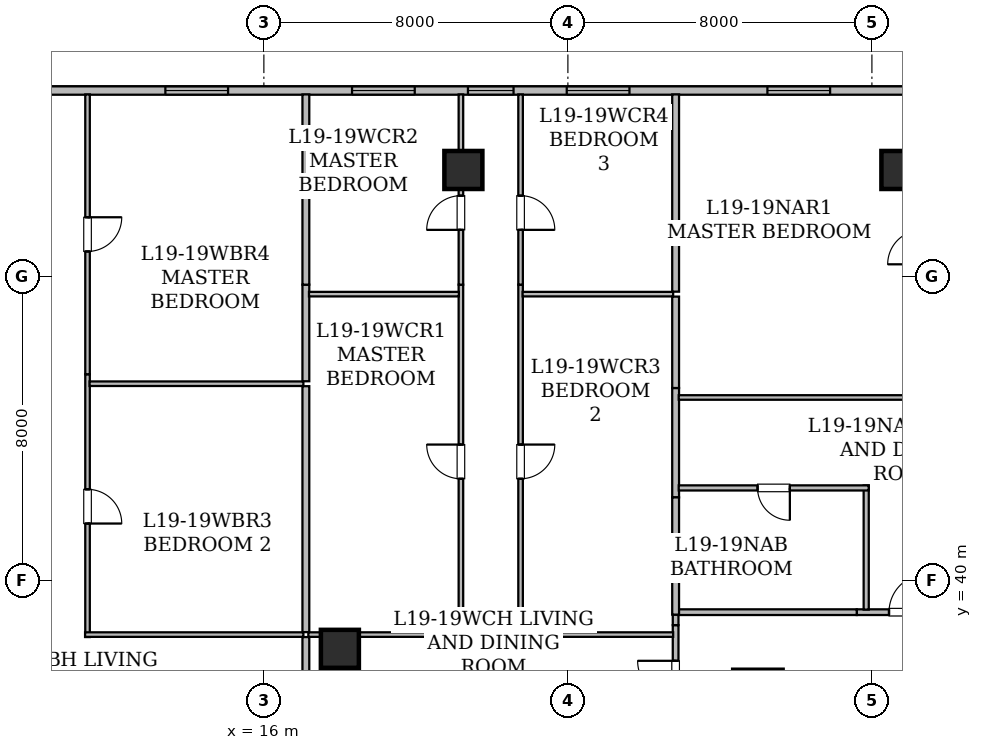
"""IFC4 building model, lengths in metres.
Left out: names, types, materials, properties, quantities, classifications, styles, units other than length and angle.
Written with IfcOpenShell. Run it as: python <this file> out.ifc"""

import sys

from ifc_helpers import new_model, si_unit, direction, frame, frame_2d, origin, origin_2d, place, context, subcontext, project, spatial, rectangle, hollow_rectangle, extrude, element, fill, save


model = new_model("IFC4")
c1 = context("Model", 3, precision=1e-05, world=origin(), true_north=direction((0.0, 1.0)))
c2 = subcontext(c1, "Body", "Model", "MODEL_VIEW")
j1 = project(units=[si_unit("LENGTHUNIT", "METRE"), si_unit("PLANEANGLEUNIT", "RADIAN")], contexts=[c1])
p1 = place(None, origin())
s1 = spatial("IfcSite", under=j1, at=p1, CompositionType="ELEMENT")
p2 = place(p1, origin())
s2 = spatial("IfcBuilding", under=s1, at=p2, CompositionType="ELEMENT")
p3 = place(p2, frame((0.0, 0.0, 77.1)))
s3 = spatial("IfcBuildingStorey", under=s2, at=p3, CompositionType="ELEMENT", Elevation=77.1)
p4 = place(p3, frame((29.0, 37.0, 0.0), z_axis=(0.0, 0.0, 1.0), x_axis=(1.0, 0.0, 0.0)))
e1 = element("IfcColumn", 1, at=p4, inside=s3, PredefinedType="COLUMN", context=c2, shape_type="SweptSolid", body=[
    extrude(hollow_rectangle(XDim=1.3, YDim=1.3, WallThickness=0.065, at=origin_2d()), origin(), (0.0, 0.0, 1.0), 3.65),
])
for number, where, z_axis, x_axis in (
    (2, (21.25, 50.8, 0.0), (0.0, 0.0, 1.0), (1.0, 0.0, 0.0)),
    (3, (32.75, 50.8, 0.0), (0.0, 0.0, 1.0), (1.0, 0.0, 0.0)),
    (4, (18.0, 38.2, 0.0), (0.0, 0.0, 1.0), (1.0, 0.0, 0.0)),
):
    element("IfcColumn", number, at=place(p3, frame(where, z_axis=z_axis, x_axis=x_axis)), inside=s3, PredefinedType="COLUMN", context=c2, shape_type="SweptSolid", body=[
        extrude(hollow_rectangle(XDim=1.0, YDim=1.0, WallThickness=0.05, at=origin_2d()), origin(), (0.0, 0.0, 1.0), 3.65),
    ])
p5 = place(p3, frame((8.315, 52.89, 0.0), z_axis=(0.0, 0.0, 1.0), x_axis=(1.0, 0.0, 0.0)))
e5 = element("IfcWall", 5, at=p5, inside=s3, PredefinedType="STANDARD", context=c2, shape_type="SweptSolid", body=[
    extrude(rectangle(XDim=37.439, YDim=0.22, at=frame_2d((18.719, 0.0))), origin(), (0.0, 0.0, 1.0), 3.43),
])
p6 = place(p5, frame((5.093, 0.0, 0.85)))
e6 = element("IfcOpeningElement", 6, at=p6, cuts=e5, PredefinedType="OPENING", context=c2, shape_type="SweptSolid", body=[
    extrude(rectangle(XDim=1.65, YDim=1.55, at=frame_2d((0.825, 0.775))), frame((0.0, 0.12, 0.0), z_axis=(0.0, -1.0, 0.0), x_axis=(1.0, 0.0, 0.0)), (0.0, 0.0, 1.0), 0.24),
])
p7 = place(p5, frame((13.055, 0.0, 0.8)))
e7 = element("IfcOpeningElement", 7, at=p7, cuts=e5, PredefinedType="OPENING", context=c2, shape_type="SweptSolid", body=[
    extrude(rectangle(XDim=1.2, YDim=1.5, at=frame_2d((0.6, 0.75))), frame((0.0, 0.12, 0.0), z_axis=(0.0, -1.0, 0.0), x_axis=(1.0, 0.0, 0.0)), (0.0, 0.0, 1.0), 0.24),
])
p8 = place(p5, frame((10.005, 0.0, 0.85)))
e8 = element("IfcOpeningElement", 8, at=p8, cuts=e5, PredefinedType="OPENING", context=c2, shape_type="SweptSolid", body=[
    extrude(rectangle(XDim=1.65, YDim=1.55, at=frame_2d((0.825, 0.775))), frame((0.0, 0.12, 0.0), z_axis=(0.0, -1.0, 0.0), x_axis=(1.0, 0.0, 0.0)), (0.0, 0.0, 1.0), 0.24),
])
p9 = place(p5, frame((15.655, 0.0, 0.85)))
e9 = element("IfcOpeningElement", 9, at=p9, cuts=e5, PredefinedType="OPENING", context=c2, shape_type="SweptSolid", body=[
    extrude(rectangle(XDim=1.65, YDim=1.55, at=frame_2d((0.825, 0.775))), frame((0.0, 0.12, 0.0), z_axis=(0.0, -1.0, 0.0), x_axis=(1.0, 0.0, 0.0)), (0.0, 0.0, 1.0), 0.24),
])
p10 = place(p5, frame((25.185, 0.0, 0.8)))
e10 = element("IfcOpeningElement", 10, at=p10, cuts=e5, PredefinedType="OPENING", context=c2, shape_type="SweptSolid", body=[
    extrude(rectangle(XDim=1.2, YDim=1.5, at=frame_2d((0.6, 0.75))), frame((0.0, 0.12, 0.0), z_axis=(0.0, -1.0, 0.0), x_axis=(1.0, 0.0, 0.0)), (0.0, 0.0, 1.0), 0.24),
])
p11 = place(p5, frame((20.935, 0.0, 0.85)))
e11 = element("IfcOpeningElement", 11, at=p11, cuts=e5, PredefinedType="OPENING", context=c2, shape_type="SweptSolid", body=[
    extrude(rectangle(XDim=1.65, YDim=1.55, at=frame_2d((0.825, 0.775))), frame((0.0, 0.12, 0.0), z_axis=(0.0, -1.0, 0.0), x_axis=(1.0, 0.0, 0.0)), (0.0, 0.0, 1.0), 0.24),
])
p12 = place(p5, frame((28.985, 0.0, 0.85)))
e12 = element("IfcOpeningElement", 12, at=p12, cuts=e5, PredefinedType="OPENING", context=c2, shape_type="SweptSolid", body=[
    extrude(rectangle(XDim=1.65, YDim=1.55, at=frame_2d((0.825, 0.775))), frame((0.0, 0.12, 0.0), z_axis=(0.0, -1.0, 0.0), x_axis=(1.0, 0.0, 0.0)), (0.0, 0.0, 1.0), 0.24),
])
p13 = place(p5, frame((33.98, 0.0, 0.85)))
e13 = element("IfcOpeningElement", 13, at=p13, cuts=e5, PredefinedType="OPENING", context=c2, shape_type="SweptSolid", body=[
    extrude(rectangle(XDim=1.65, YDim=1.55, at=frame_2d((0.825, 0.775))), frame((0.0, 0.12, 0.0), z_axis=(0.0, -1.0, 0.0), x_axis=(1.0, 0.0, 0.0)), (0.0, 0.0, 1.0), 0.24),
])
p14 = place(p3, frame((26.835, 35.946, 0.0), z_axis=(0.0, 0.0, 1.0), x_axis=(0.0, 1.0, 0.0)))
e14 = element("IfcWall", 14, at=p14, inside=s3, PredefinedType="STANDARD", context=c2, shape_type="SweptSolid", body=[
    extrude(rectangle(XDim=2.878, YDim=0.15, at=frame_2d((1.439, 0.0))), origin(), (0.0, 0.0, 1.0), 2.647),
])
p15 = place(p14, frame((0.939, 0.0, 0.0)))
e15 = element("IfcOpeningElement", 15, at=p15, cuts=e14, PredefinedType="OPENING", context=c2, shape_type="SweptSolid", body=[
    extrude(rectangle(XDim=1.0, YDim=2.15, at=frame_2d((0.5, 1.075))), frame((0.0, 0.085, 0.0), z_axis=(0.0, -1.0, 0.0), x_axis=(1.0, 0.0, 0.0)), (0.0, 0.0, 1.0), 0.17),
])
p16 = place(p3, frame((26.835, 38.824, 0.0), z_axis=(0.0, 0.0, 1.0), x_axis=(0.0, 1.0, 0.0)))
e16 = element("IfcWall", 16, at=p16, inside=s3, PredefinedType="STANDARD", context=c2, shape_type="SweptSolid", body=[
    extrude(rectangle(XDim=0.276, YDim=0.15, at=frame_2d((0.138, 0.0))), origin(), (0.0, 0.0, 1.0), 3.43),
])
p17 = place(p3, frame((31.601, 39.165, 0.0), z_axis=(0.0, 0.0, 1.0), x_axis=(1.0, 0.0, 0.0)))
e17 = element("IfcWall", 17, at=p17, inside=s3, PredefinedType="STANDARD", context=c2, shape_type="SweptSolid", body=[
    extrude(rectangle(XDim=2.698, YDim=0.15, at=frame_2d((1.349, 0.0))), origin(), (0.0, 0.0, 1.0), 3.43),
])
p18 = place(p17, frame((0.849, 0.0, 0.0)))
e18 = element("IfcOpeningElement", 18, at=p18, cuts=e17, PredefinedType="OPENING", context=c2, shape_type="SweptSolid", body=[
    extrude(rectangle(XDim=1.0, YDim=2.15, at=frame_2d((0.5, 1.075))), frame((0.0, 0.085, 0.0), z_axis=(0.0, -1.0, 0.0), x_axis=(1.0, 0.0, 0.0)), (0.0, 0.0, 1.0), 0.17),
])
p19 = place(p3, frame((26.9, 39.165, 0.0), z_axis=(0.0, 0.0, 1.0), x_axis=(1.0, 0.0, 0.0)))
e19 = element("IfcWall", 19, at=p19, inside=s3, PredefinedType="STANDARD", context=c2, shape_type="SweptSolid", body=[
    extrude(rectangle(XDim=4.701, YDim=0.15, at=frame_2d((2.351, 0.0))), origin(), (0.0, 0.0, 1.0), 2.647),
])
p20 = place(p3, frame((11.36, 45.425, 0.0), z_axis=(0.0, 0.0, 1.0), x_axis=(0.0, -1.0, 0.0)))
e20 = element("IfcWall", 20, at=p20, inside=s3, PredefinedType="PARTITIONING", context=c2, shape_type="SweptSolid", body=[
    extrude(rectangle(XDim=6.915, YDim=0.12, at=frame_2d((3.458, 0.0))), origin(), (0.0, 0.0, 1.0), 2.647),
])
p21 = place(p20, frame((3.028, 0.0, 0.0)))
e21 = element("IfcOpeningElement", 21, at=p21, cuts=e20, PredefinedType="OPENING", context=c2, shape_type="SweptSolid", body=[
    extrude(rectangle(XDim=0.9, YDim=2.1, at=frame_2d((0.45, 1.05))), frame((0.0, 0.07, 0.0), z_axis=(0.0, -1.0, 0.0), x_axis=(1.0, 0.0, 0.0)), (0.0, 0.0, 1.0), 0.14),
])
p22 = place(p3, frame((11.295, 38.575, 0.0), z_axis=(0.0, 0.0, 1.0), x_axis=(1.0, 0.0, 0.0)))
e22 = element("IfcWall", 22, at=p22, inside=s3, PredefinedType="PARTITIONING", context=c2, shape_type="SweptSolid", body=[
    extrude(rectangle(XDim=5.745, YDim=0.12, at=frame_2d((2.873, 0.0))), origin(), (0.0, 0.0, 1.0), 2.647),
])
p23 = place(p3, frame((11.36, 52.788, 0.0), z_axis=(0.0, 0.0, 1.0), x_axis=(0.0, -1.0, 0.0)))
e23 = element("IfcWall", 23, at=p23, inside=s3, PredefinedType="PARTITIONING", context=c2, shape_type="SweptSolid", body=[
    extrude(rectangle(XDim=7.363, YDim=0.12, at=frame_2d((3.682, 0.0))), origin(), (0.0, 0.0, 1.0), 2.647),
])
p24 = place(p23, frame((3.232, 0.0, 0.0)))
e24 = element("IfcOpeningElement", 24, at=p24, cuts=e23, PredefinedType="OPENING", context=c2, shape_type="SweptSolid", body=[
    extrude(rectangle(XDim=0.9, YDim=2.1, at=frame_2d((0.45, 1.05))), frame((0.0, 0.07, 0.0), z_axis=(0.0, -1.0, 0.0), x_axis=(1.0, 0.0, 0.0)), (0.0, 0.0, 1.0), 0.14),
])
p25 = place(p3, frame((17.105, 38.51, 0.0), z_axis=(0.0, 0.0, 1.0), x_axis=(0.0, -1.0, 0.0)))
e25 = element("IfcWall", 25, at=p25, inside=s3, PredefinedType="STANDARD", context=c2, shape_type="SweptSolid", body=[
    extrude(rectangle(XDim=2.25, YDim=0.18, at=frame_2d((1.125, 0.0))), origin(), (0.0, 0.0, 1.0), 2.647),
])
p26 = place(p3, frame((11.414, 45.176, 0.0), z_axis=(0.0, 0.0, 1.0), x_axis=(1.0, 0.0, 0.0)))
e26 = element("IfcWall", 26, at=p26, inside=s3, PredefinedType="PARTITIONING", context=c2, shape_type="SweptSolid", body=[
    extrude(rectangle(XDim=5.626, YDim=0.12, at=frame_2d((2.813, 0.0))), origin(), (0.0, 0.0, 1.0), 2.647),
])
p27 = place(p3, frame((17.105, 45.111, 0.0), z_axis=(0.0, 0.0, 1.0), x_axis=(0.0, -1.0, 0.0)))
e27 = element("IfcWall", 27, at=p27, inside=s3, PredefinedType="STANDARD", context=c2, shape_type="SweptSolid", body=[
    extrude(rectangle(XDim=6.471, YDim=0.18, at=frame_2d((3.236, 0.0))), origin(), (0.0, 0.0, 1.0), 2.647),
])
p28 = place(p3, frame((17.105, 47.782, 0.0), z_axis=(0.0, 0.0, 1.0), x_axis=(0.0, -1.0, 0.0)))
e28 = element("IfcWall", 28, at=p28, inside=s3, PredefinedType="STANDARD", context=c2, shape_type="SweptSolid", body=[
    extrude(rectangle(XDim=2.541, YDim=0.18, at=frame_2d((1.271, 0.0))), origin(), (0.0, 0.0, 1.0), 3.43),
])
p29 = place(p3, frame((17.105, 52.788, 0.0), z_axis=(0.0, 0.0, 1.0), x_axis=(0.0, -1.0, 0.0)))
e29 = element("IfcWall", 29, at=p29, inside=s3, PredefinedType="STANDARD", context=c2, shape_type="SweptSolid", body=[
    extrude(rectangle(XDim=5.006, YDim=0.18, at=frame_2d((2.503, 0.0))), origin(), (0.0, 0.0, 1.0), 2.803),
])
p30 = place(p3, frame((17.17, 38.575, 0.0), z_axis=(0.0, 0.0, 1.0), x_axis=(1.0, 0.0, 0.0)))
e30 = element("IfcWall", 30, at=p30, inside=s3, PredefinedType="PARTITIONING", context=c2, shape_type="SweptSolid", body=[
    extrude(rectangle(XDim=4.08, YDim=0.12, at=frame_2d((2.04, 0.0))), origin(), (0.0, 0.0, 1.0), 2.647),
])
p31 = place(p3, frame((21.185, 38.51, 0.0), z_axis=(0.0, 0.0, 1.0), x_axis=(0.0, 1.0, 0.0)))
e31 = element("IfcWall", 31, at=p31, inside=s3, PredefinedType="PARTITIONING", context=c2, shape_type="SweptSolid", body=[
    extrude(rectangle(XDim=9.272, YDim=0.12, at=frame_2d((4.636, 0.0))), origin(), (0.0, 0.0, 1.0), 2.961),
])
p32 = place(p31, frame((4.165, 0.0, 0.0)))
e32 = element("IfcOpeningElement", 32, at=p32, cuts=e31, PredefinedType="OPENING", context=c2, shape_type="SweptSolid", body=[
    extrude(rectangle(XDim=0.9, YDim=2.1, at=frame_2d((0.45, 1.05))), frame((0.0, 0.07, 0.0), z_axis=(0.0, -1.0, 0.0), x_axis=(1.0, 0.0, 0.0)), (0.0, 0.0, 1.0), 0.14),
])
p33 = place(p3, frame((21.185, 47.782, 0.0), z_axis=(0.0, 0.0, 1.0), x_axis=(0.0, 1.0, 0.0)))
e33 = element("IfcWall", 33, at=p33, inside=s3, PredefinedType="PARTITIONING", context=c2, shape_type="SweptSolid", body=[
    extrude(rectangle(XDim=5.006, YDim=0.12, at=frame_2d((2.503, 0.0))), origin(), (0.0, 0.0, 1.0), 2.647),
])
p34 = place(p33, frame((1.442, 0.0, 0.0)))
e34 = element("IfcOpeningElement", 34, at=p34, cuts=e33, PredefinedType="OPENING", context=c2, shape_type="SweptSolid", body=[
    extrude(rectangle(XDim=0.9, YDim=2.1, at=frame_2d((0.45, 1.05))), frame((0.0, 0.07, 0.0), z_axis=(0.0, -1.0, 0.0), x_axis=(1.0, 0.0, 0.0)), (0.0, 0.0, 1.0), 0.14),
])
p35 = place(p3, frame((22.755, 47.782, 0.0), z_axis=(0.0, 0.0, 1.0), x_axis=(0.0, -1.0, 0.0)))
e35 = element("IfcWall", 35, at=p35, inside=s3, PredefinedType="PARTITIONING", context=c2, shape_type="SweptSolid", body=[
    extrude(rectangle(XDim=9.272, YDim=0.12, at=frame_2d((4.636, 0.0))), origin(), (0.0, 0.0, 1.0), 2.961),
])
p36 = place(p35, frame((4.207, 0.0, 0.0)))
e36 = element("IfcOpeningElement", 36, at=p36, cuts=e35, PredefinedType="OPENING", context=c2, shape_type="SweptSolid", body=[
    extrude(rectangle(XDim=0.9, YDim=2.1, at=frame_2d((0.45, 1.05))), frame((0.0, 0.07, 0.0), z_axis=(0.0, -1.0, 0.0), x_axis=(1.0, 0.0, 0.0)), (0.0, 0.0, 1.0), 0.14),
])
p37 = place(p3, frame((22.69, 38.575, 0.0), z_axis=(0.0, 0.0, 1.0), x_axis=(1.0, 0.0, 0.0)))
e37 = element("IfcWall", 37, at=p37, inside=s3, PredefinedType="PARTITIONING", context=c2, shape_type="SweptSolid", body=[
    extrude(rectangle(XDim=4.08, YDim=0.12, at=frame_2d((2.04, 0.0))), origin(), (0.0, 0.0, 1.0), 3.43),
])
p38 = place(p3, frame((22.755, 52.788, 0.0), z_axis=(0.0, 0.0, 1.0), x_axis=(0.0, -1.0, 0.0)))
e38 = element("IfcWall", 38, at=p38, inside=s3, PredefinedType="PARTITIONING", context=c2, shape_type="SweptSolid", body=[
    extrude(rectangle(XDim=5.006, YDim=0.12, at=frame_2d((2.503, 0.0))), origin(), (0.0, 0.0, 1.0), 2.803),
])
p39 = place(p38, frame((2.664, 0.0, 0.0)))
e39 = element("IfcOpeningElement", 39, at=p39, cuts=e38, PredefinedType="OPENING", context=c2, shape_type="SweptSolid", body=[
    extrude(rectangle(XDim=0.9, YDim=2.1, at=frame_2d((0.45, 1.05))), frame((0.0, 0.07, 0.0), z_axis=(0.0, -1.0, 0.0), x_axis=(1.0, 0.0, 0.0)), (0.0, 0.0, 1.0), 0.14),
])
p40 = place(p3, frame((17.187, 47.533, 0.0), z_axis=(0.0, 0.0, 1.0), x_axis=(1.0, 0.0, 0.0)))
e40 = element("IfcWall", 40, at=p40, inside=s3, PredefinedType="PARTITIONING", context=c2, shape_type="SweptSolid", body=[
    extrude(rectangle(XDim=3.944, YDim=0.12, at=frame_2d((1.972, 0.0))), origin(), (0.0, 0.0, 1.0), 2.647),
])
p41 = place(p3, frame((22.809, 47.533, 0.0), z_axis=(0.0, 0.0, 1.0), x_axis=(1.0, 0.0, 0.0)))
e41 = element("IfcWall", 41, at=p41, inside=s3, PredefinedType="PARTITIONING", context=c2, shape_type="SweptSolid", body=[
    extrude(rectangle(XDim=3.961, YDim=0.12, at=frame_2d((1.98, 0.0))), origin(), (0.0, 0.0, 1.0), 3.43),
])
p42 = place(p3, frame((26.835, 45.063, 0.0), z_axis=(0.0, 0.0, 1.0), x_axis=(0.0, -1.0, 0.0)))
e42 = element("IfcWall", 42, at=p42, inside=s3, PredefinedType="STANDARD", context=c2, shape_type="SweptSolid", body=[
    extrude(rectangle(XDim=2.878, YDim=0.18, at=frame_2d((1.439, 0.0))), origin(), (0.0, 0.0, 1.0), 2.961),
])
p43 = place(p3, frame((26.835, 42.185, 0.0), z_axis=(0.0, 0.0, 1.0), x_axis=(0.0, -1.0, 0.0)))
e43 = element("IfcWall", 43, at=p43, inside=s3, PredefinedType="STANDARD", context=c2, shape_type="SweptSolid", body=[
    extrude(rectangle(XDim=3.085, YDim=0.18, at=frame_2d((1.542, 0.0))), origin(), (0.0, 0.0, 1.0), 3.43),
])
p44 = place(p3, frame((26.835, 47.468, 0.0), z_axis=(0.0, 0.0, 1.0), x_axis=(0.0, -1.0, 0.0)))
e44 = element("IfcWall", 44, at=p44, inside=s3, PredefinedType="STANDARD", context=c2, shape_type="SweptSolid", body=[
    extrude(rectangle(XDim=2.405, YDim=0.18, at=frame_2d((1.203, 0.0))), origin(), (0.0, 0.0, 1.0), 3.43),
])
p45 = place(p3, frame((26.835, 52.788, 0.0), z_axis=(0.0, 0.0, 1.0), x_axis=(0.0, -1.0, 0.0)))
e45 = element("IfcWall", 45, at=p45, inside=s3, PredefinedType="STANDARD", context=c2, shape_type="SweptSolid", body=[
    extrude(rectangle(XDim=5.19, YDim=0.18, at=frame_2d((2.595, 0.0))), origin(), (0.0, 0.0, 1.0), 2.803),
])
p46 = place(p3, frame((31.85, 39.232, 0.0), z_axis=(0.0, 0.0, 1.0), x_axis=(0.0, 1.0, 0.0)))
e46 = element("IfcWall", 46, at=p46, inside=s3, PredefinedType="PARTITIONING", context=c2, shape_type="SweptSolid", body=[
    extrude(rectangle(XDim=3.267, YDim=0.135, at=frame_2d((1.634, 0.0))), origin(), (0.0, 0.0, 1.0), 3.43),
])
p47 = place(p3, frame((31.915, 42.434, 0.0), z_axis=(0.0, 0.0, 1.0), x_axis=(-1.0, 0.0, 0.0)))
e47 = element("IfcWall", 47, at=p47, inside=s3, PredefinedType="PARTITIONING", context=c2, shape_type="SweptSolid", body=[
    extrude(rectangle(XDim=4.998, YDim=0.135, at=frame_2d((2.499, 0.0))), origin(), (0.0, 0.0, 1.0), 2.647),
])
p48 = place(p47, frame((2.074, 0.0, 0.0)))
e48 = element("IfcOpeningElement", 48, at=p48, cuts=e47, PredefinedType="OPENING", context=c2, shape_type="SweptSolid", body=[
    extrude(rectangle(XDim=0.85, YDim=2.1, at=frame_2d((0.425, 1.05))), frame((0.0, 0.077, 0.0), z_axis=(0.0, -1.0, 0.0), x_axis=(1.0, 0.0, 0.0)), (0.0, 0.0, 1.0), 0.155),
])
p49 = place(p3, frame((26.917, 44.814, 0.0), z_axis=(0.0, 0.0, 1.0), x_axis=(1.0, 0.0, 0.0)))
e49 = element("IfcWall", 49, at=p49, inside=s3, PredefinedType="PARTITIONING", context=c2, shape_type="SweptSolid", body=[
    extrude(rectangle(XDim=6.463, YDim=0.12, at=frame_2d((3.231, 0.0))), origin(), (0.0, 0.0, 1.0), 2.647),
])
p50 = place(p6, origin())
e50 = element("IfcWindow", 50, at=p50, inside=s3, PartitioningType="SINGLE_PANEL", PredefinedType="WINDOW", context=c2, shape_type="SweptSolid", body=[
    extrude(rectangle(XDim=1.65, YDim=1.55, at=frame_2d((0.825, 0.775))), frame((0.0, 0.03, 0.0), z_axis=(0.0, -1.0, 0.0), x_axis=(1.0, 0.0, 0.0)), (0.0, 0.0, 1.0), 0.06),
])
fill(e6, e50)
p51 = place(p7, origin())
e51 = element("IfcWindow", 51, at=p51, inside=s3, PartitioningType="SINGLE_PANEL", PredefinedType="WINDOW", context=c2, shape_type="SweptSolid", body=[
    extrude(rectangle(XDim=1.2, YDim=1.5, at=frame_2d((0.6, 0.75))), frame((0.0, 0.03, 0.0), z_axis=(0.0, -1.0, 0.0), x_axis=(1.0, 0.0, 0.0)), (0.0, 0.0, 1.0), 0.06),
])
fill(e7, e51)
p52 = place(p8, origin())
e52 = element("IfcWindow", 52, at=p52, inside=s3, PartitioningType="SINGLE_PANEL", PredefinedType="WINDOW", context=c2, shape_type="SweptSolid", body=[
    extrude(rectangle(XDim=1.65, YDim=1.55, at=frame_2d((0.825, 0.775))), frame((0.0, 0.03, 0.0), z_axis=(0.0, -1.0, 0.0), x_axis=(1.0, 0.0, 0.0)), (0.0, 0.0, 1.0), 0.06),
])
fill(e8, e52)
p53 = place(p9, origin())
e53 = element("IfcWindow", 53, at=p53, inside=s3, PartitioningType="SINGLE_PANEL", PredefinedType="WINDOW", context=c2, shape_type="SweptSolid", body=[
    extrude(rectangle(XDim=1.65, YDim=1.55, at=frame_2d((0.825, 0.775))), frame((0.0, 0.03, 0.0), z_axis=(0.0, -1.0, 0.0), x_axis=(1.0, 0.0, 0.0)), (0.0, 0.0, 1.0), 0.06),
])
fill(e9, e53)
p54 = place(p11, origin())
e54 = element("IfcWindow", 54, at=p54, inside=s3, PartitioningType="SINGLE_PANEL", PredefinedType="WINDOW", context=c2, shape_type="SweptSolid", body=[
    extrude(rectangle(XDim=1.65, YDim=1.55, at=frame_2d((0.825, 0.775))), frame((0.0, 0.03, 0.0), z_axis=(0.0, -1.0, 0.0), x_axis=(1.0, 0.0, 0.0)), (0.0, 0.0, 1.0), 0.06),
])
fill(e11, e54)
p55 = place(p15, origin())
e55 = element("IfcDoor", 55, at=p55, inside=s3, OperationType="SINGLE_SWING_RIGHT", PredefinedType="DOOR", context=c2, shape_type="SweptSolid", body=[
    extrude(rectangle(XDim=1.0, YDim=2.15, at=frame_2d((0.5, 1.075))), frame((0.0, 0.025, 0.0), z_axis=(0.0, -1.0, 0.0), x_axis=(1.0, 0.0, 0.0)), (0.0, 0.0, 1.0), 0.05),
])
fill(e15, e55)
p56 = place(p18, origin())
e56 = element("IfcDoor", 56, at=p56, inside=s3, OperationType="SINGLE_SWING_RIGHT", PredefinedType="DOOR", context=c2, shape_type="SweptSolid", body=[
    extrude(rectangle(XDim=1.0, YDim=2.15, at=frame_2d((0.5, 1.075))), frame((0.0, 0.025, 0.0), z_axis=(0.0, -1.0, 0.0), x_axis=(1.0, 0.0, 0.0)), (0.0, 0.0, 1.0), 0.05),
])
fill(e18, e56)
p57 = place(p21, origin())
e57 = element("IfcDoor", 57, at=p57, inside=s3, OperationType="SINGLE_SWING_RIGHT", PredefinedType="DOOR", context=c2, shape_type="SweptSolid", body=[
    extrude(rectangle(XDim=0.9, YDim=2.1, at=frame_2d((0.45, 1.05))), frame((0.0, 0.025, 0.0), z_axis=(0.0, -1.0, 0.0), x_axis=(1.0, 0.0, 0.0)), (0.0, 0.0, 1.0), 0.05),
])
fill(e21, e57)
p58 = place(p24, origin())
e58 = element("IfcDoor", 58, at=p58, inside=s3, OperationType="SINGLE_SWING_LEFT", PredefinedType="DOOR", context=c2, shape_type="SweptSolid", body=[
    extrude(rectangle(XDim=0.9, YDim=2.1, at=frame_2d((0.45, 1.05))), frame((0.0, 0.025, 0.0), z_axis=(0.0, -1.0, 0.0), x_axis=(1.0, 0.0, 0.0)), (0.0, 0.0, 1.0), 0.05),
])
fill(e24, e58)
p59 = place(p32, origin())
e59 = element("IfcDoor", 59, at=p59, inside=s3, OperationType="SINGLE_SWING_RIGHT", PredefinedType="DOOR", context=c2, shape_type="SweptSolid", body=[
    extrude(rectangle(XDim=0.9, YDim=2.1, at=frame_2d((0.45, 1.05))), frame((0.0, 0.025, 0.0), z_axis=(0.0, -1.0, 0.0), x_axis=(1.0, 0.0, 0.0)), (0.0, 0.0, 1.0), 0.05),
])
fill(e32, e59)
p60 = place(p34, origin())
e60 = element("IfcDoor", 60, at=p60, inside=s3, OperationType="SINGLE_SWING_LEFT", PredefinedType="DOOR", context=c2, shape_type="SweptSolid", body=[
    extrude(rectangle(XDim=0.9, YDim=2.1, at=frame_2d((0.45, 1.05))), frame((0.0, 0.025, 0.0), z_axis=(0.0, -1.0, 0.0), x_axis=(1.0, 0.0, 0.0)), (0.0, 0.0, 1.0), 0.05),
])
fill(e34, e60)
p61 = place(p36, origin())
e61 = element("IfcDoor", 61, at=p61, inside=s3, OperationType="SINGLE_SWING_LEFT", PredefinedType="DOOR", context=c2, shape_type="SweptSolid", body=[
    extrude(rectangle(XDim=0.9, YDim=2.1, at=frame_2d((0.45, 1.05))), frame((0.0, 0.025, 0.0), z_axis=(0.0, -1.0, 0.0), x_axis=(1.0, 0.0, 0.0)), (0.0, 0.0, 1.0), 0.05),
])
fill(e36, e61)
p62 = place(p39, origin())
e62 = element("IfcDoor", 62, at=p62, inside=s3, OperationType="SINGLE_SWING_RIGHT", PredefinedType="DOOR", context=c2, shape_type="SweptSolid", body=[
    extrude(rectangle(XDim=0.9, YDim=2.1, at=frame_2d((0.45, 1.05))), frame((0.0, 0.025, 0.0), z_axis=(0.0, -1.0, 0.0), x_axis=(1.0, 0.0, 0.0)), (0.0, 0.0, 1.0), 0.05),
])
fill(e39, e62)
p63 = place(p48, origin())
e63 = element("IfcDoor", 63, at=p63, inside=s3, OperationType="SINGLE_SWING_LEFT", PredefinedType="DOOR", context=c2, shape_type="SweptSolid", body=[
    extrude(rectangle(XDim=0.85, YDim=2.1, at=frame_2d((0.425, 1.05))), frame((0.0, 0.025, 0.0), z_axis=(0.0, -1.0, 0.0), x_axis=(1.0, 0.0, 0.0)), (0.0, 0.0, 1.0), 0.05),
])
fill(e48, e63)
save(model, sys.argv[1])
